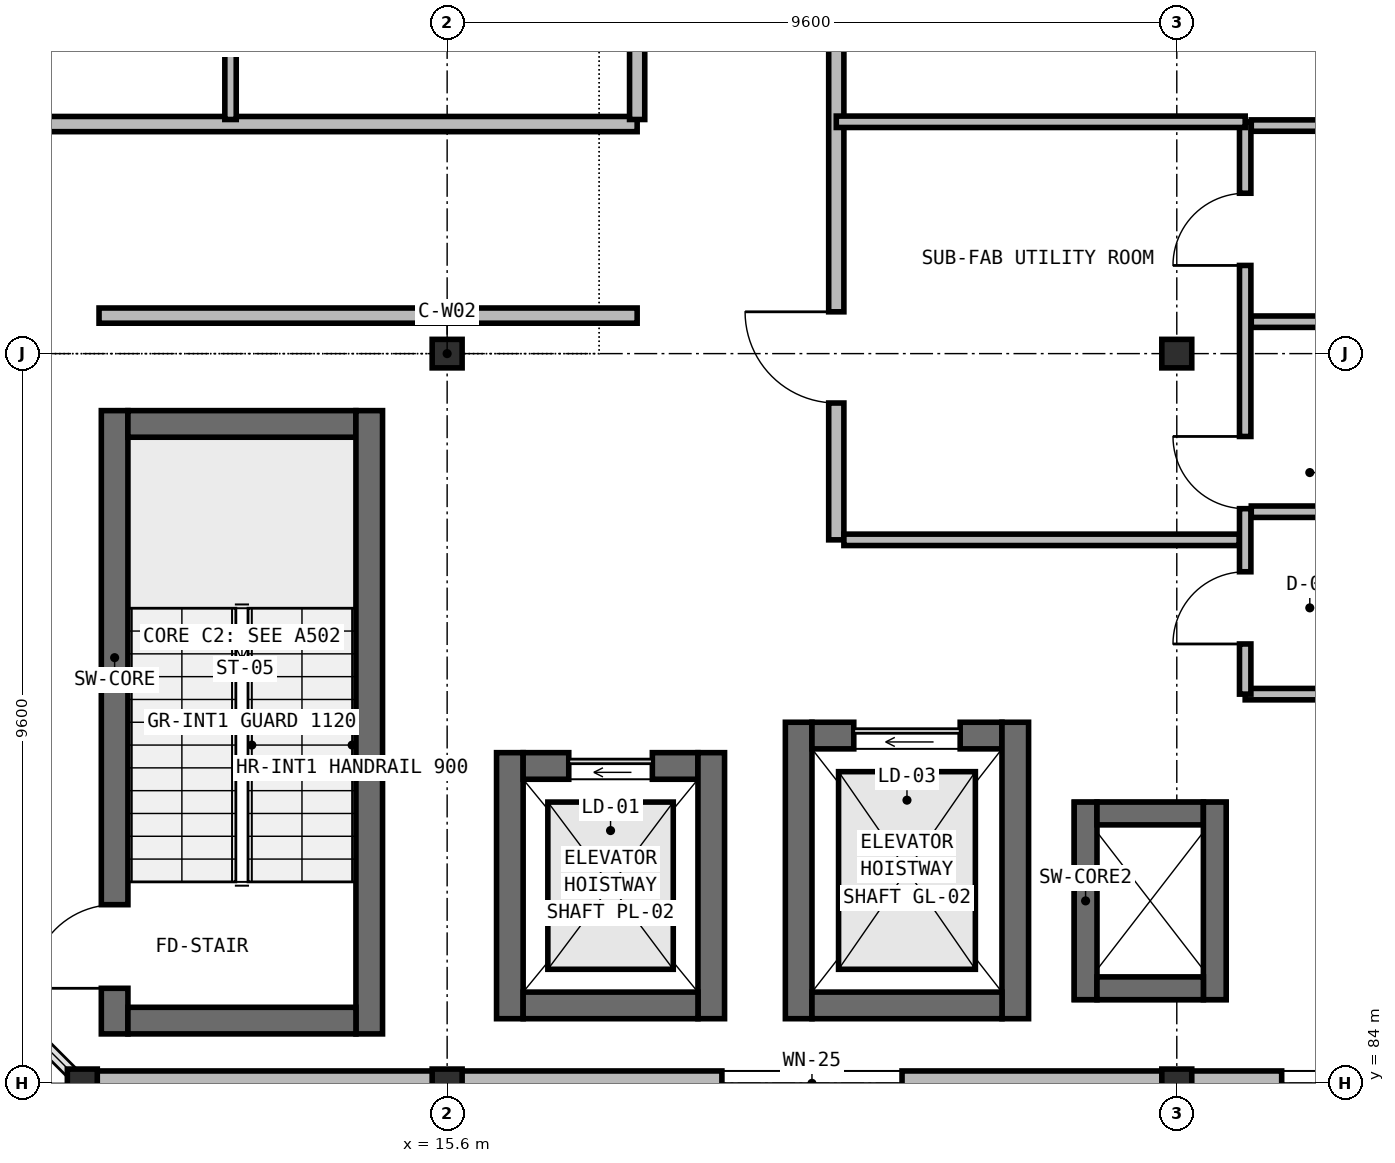
"""IFC4 building model, lengths in metres.
Left out: names, types, materials, properties, quantities, classifications, styles, units other than length and angle.
Written with IfcOpenShell. Run it as: python <this file> out.ifc"""

import sys

from ifc_helpers import new_model, si_unit, direction, frame, frame_2d, origin, origin_2d, place, context, subcontext, project, spatial, rectangle, i_section, extrude, element, fill, save


model = new_model("IFC4")
c1 = context("Model", 3, precision=1e-05, world=origin(), true_north=direction((0.0, 1.0)))
c2 = subcontext(c1, "Body", "Model", "MODEL_VIEW")
j1 = project(units=[si_unit("LENGTHUNIT", "METRE"), si_unit("PLANEANGLEUNIT", "RADIAN")], contexts=[c1])
p1 = place(None, origin())
s1 = spatial("IfcSite", under=j1, at=p1, CompositionType="ELEMENT")
p2 = place(p1, origin())
s2 = spatial("IfcBuilding", under=s1, at=p2, CompositionType="ELEMENT")
p3 = place(p2, frame((0.0, 0.0, 5.25)))
s3 = spatial("IfcBuildingStorey", under=s2, at=p3, CompositionType="ELEMENT", Elevation=5.25)
p4 = place(p3, frame((11.225, 84.65, 0.0), z_axis=(0.0, 0.0, 1.0), x_axis=(0.0, 1.0, 0.0)))
e1 = element("IfcWall", 1, at=p4, inside=s3, PredefinedType="SHEAR", context=c2, shape_type="SweptSolid", body=[
    extrude(rectangle(XDim=8.2, YDim=0.35, at=frame_2d((4.1, 0.0))), origin(), (0.0, 0.0, 1.0), 4.55),
])
p5 = place(p4, frame((0.6, 0.0, 0.0)))
e2 = element("IfcOpeningElement", 2, at=p5, cuts=e1, PredefinedType="OPENING", context=c2, shape_type="SweptSolid", body=[
    extrude(rectangle(XDim=1.1, YDim=2.15, at=frame_2d((0.55, 1.075))), frame((0.0, 0.185, 0.0), z_axis=(0.0, -1.0, 0.0), x_axis=(1.0, 0.0, 0.0)), (0.0, 0.0, 1.0), 0.37),
])
p6 = place(p3, frame((11.4, 92.675, 0.0), z_axis=(0.0, 0.0, 1.0), x_axis=(1.0, 0.0, 0.0)))
e3 = element("IfcWall", 3, at=p6, inside=s3, PredefinedType="SHEAR", context=c2, shape_type="SweptSolid", body=[
    extrude(rectangle(XDim=3.0, YDim=0.35, at=frame_2d((1.5, 0.0))), origin(), (0.0, 0.0, 1.0), 4.55),
])
p7 = place(p3, frame((14.575, 92.85, 0.0), z_axis=(0.0, 0.0, 1.0), x_axis=(0.0, -1.0, 0.0)))
e4 = element("IfcWall", 4, at=p7, inside=s3, PredefinedType="SHEAR", context=c2, shape_type="SweptSolid", body=[
    extrude(rectangle(XDim=8.2, YDim=0.35, at=frame_2d((4.1, 0.0))), origin(), (0.0, 0.0, 1.0), 4.55),
])
p8 = place(p3, frame((14.4, 84.825, 0.0), z_axis=(0.0, 0.0, 1.0), x_axis=(-1.0, 0.0, 0.0)))
e5 = element("IfcWall", 5, at=p8, inside=s3, PredefinedType="SHEAR", context=c2, shape_type="SweptSolid", body=[
    extrude(rectangle(XDim=3.0, YDim=0.35, at=frame_2d((1.5, 0.0))), origin(), (0.0, 0.0, 1.0), 4.55),
])
p9 = place(p3, frame((16.425, 84.85, 0.0), z_axis=(0.0, 0.0, 1.0), x_axis=(0.0, 1.0, 0.0)))
e6 = element("IfcWall", 6, at=p9, inside=s3, PredefinedType="SHEAR", context=c2, shape_type="SweptSolid", body=[
    extrude(rectangle(XDim=3.5, YDim=0.35, at=frame_2d((1.75, 0.0))), origin(), (0.0, 0.0, 1.0), 4.55),
])
p10 = place(p3, frame((16.6, 88.175, 0.0), z_axis=(0.0, 0.0, 1.0), x_axis=(1.0, 0.0, 0.0)))
e7 = element("IfcWall", 7, at=p10, inside=s3, PredefinedType="SHEAR", context=c2, shape_type="SweptSolid", body=[
    extrude(rectangle(XDim=2.3, YDim=0.35, at=frame_2d((1.15, 0.0))), origin(), (0.0, 0.0, 1.0), 4.55),
])
p11 = place(p10, frame((0.6, 0.0, 0.0)))
e8 = element("IfcOpeningElement", 8, at=p11, cuts=e7, PredefinedType="OPENING", context=c2, shape_type="SweptSolid", body=[
    extrude(rectangle(XDim=1.1, YDim=2.15, at=frame_2d((0.55, 1.075))), frame((0.0, 0.185, 0.0), z_axis=(0.0, -1.0, 0.0), x_axis=(1.0, 0.0, 0.0)), (0.0, 0.0, 1.0), 0.37),
])
p12 = place(p3, frame((19.075, 88.35, 0.0), z_axis=(0.0, 0.0, 1.0), x_axis=(0.0, -1.0, 0.0)))
e9 = element("IfcWall", 9, at=p12, inside=s3, PredefinedType="SHEAR", context=c2, shape_type="SweptSolid", body=[
    extrude(rectangle(XDim=3.5, YDim=0.35, at=frame_2d((1.75, 0.0))), origin(), (0.0, 0.0, 1.0), 4.55),
])
p13 = place(p3, frame((18.9, 85.025, 0.0), z_axis=(0.0, 0.0, 1.0), x_axis=(-1.0, 0.0, 0.0)))
e10 = element("IfcWall", 10, at=p13, inside=s3, PredefinedType="SHEAR", context=c2, shape_type="SweptSolid", body=[
    extrude(rectangle(XDim=2.3, YDim=0.35, at=frame_2d((1.15, 0.0))), origin(), (0.0, 0.0, 1.0), 4.55),
])
p14 = place(p3, frame((20.225, 84.85, 0.0), z_axis=(0.0, 0.0, 1.0), x_axis=(0.0, 1.0, 0.0)))
e11 = element("IfcWall", 11, at=p14, inside=s3, PredefinedType="SHEAR", context=c2, shape_type="SweptSolid", body=[
    extrude(rectangle(XDim=3.9, YDim=0.35, at=frame_2d((1.95, 0.0))), origin(), (0.0, 0.0, 1.0), 4.55),
])
p15 = place(p3, frame((20.4, 88.575, 0.0), z_axis=(0.0, 0.0, 1.0), x_axis=(1.0, 0.0, 0.0)))
e12 = element("IfcWall", 12, at=p15, inside=s3, PredefinedType="SHEAR", context=c2, shape_type="SweptSolid", body=[
    extrude(rectangle(XDim=2.5, YDim=0.35, at=frame_2d((1.25, 0.0))), origin(), (0.0, 0.0, 1.0), 4.55),
])
p16 = place(p15, frame((0.55, 0.0, 0.0)))
e13 = element("IfcOpeningElement", 13, at=p16, cuts=e12, PredefinedType="OPENING", context=c2, shape_type="SweptSolid", body=[
    extrude(rectangle(XDim=1.4, YDim=2.3, at=frame_2d((0.7, 1.15))), frame((0.0, 0.185, 0.0), z_axis=(0.0, -1.0, 0.0), x_axis=(1.0, 0.0, 0.0)), (0.0, 0.0, 1.0), 0.37),
])
p17 = place(p3, frame((23.075, 88.75, 0.0), z_axis=(0.0, 0.0, 1.0), x_axis=(0.0, -1.0, 0.0)))
e14 = element("IfcWall", 14, at=p17, inside=s3, PredefinedType="SHEAR", context=c2, shape_type="SweptSolid", body=[
    extrude(rectangle(XDim=3.9, YDim=0.35, at=frame_2d((1.95, 0.0))), origin(), (0.0, 0.0, 1.0), 4.55),
])
p18 = place(p3, frame((22.9, 85.025, 0.0), z_axis=(0.0, 0.0, 1.0), x_axis=(-1.0, 0.0, 0.0)))
e15 = element("IfcWall", 15, at=p18, inside=s3, PredefinedType="SHEAR", context=c2, shape_type="SweptSolid", body=[
    extrude(rectangle(XDim=2.5, YDim=0.35, at=frame_2d((1.25, 0.0))), origin(), (0.0, 0.0, 1.0), 4.55),
])
for number, where, z_axis, x_axis in (
    (16, (15.6, 84.0, 0.0), (0.0, 0.0, 1.0), (1.0, 0.0, 0.0)),
    (17, (15.6, 93.6, 0.0), (0.0, 0.0, 1.0), (1.0, 0.0, 0.0)),
    (18, (25.2, 84.0, 0.0), (0.0, 0.0, 1.0), (1.0, 0.0, 0.0)),
    (19, (25.2, 93.6, 0.0), (0.0, 0.0, 1.0), (1.0, 0.0, 0.0)),
    (20, (10.8, 84.0, 0.0), (0.0, 0.0, 1.0), (1.0, 0.0, 0.0)),
):
    element("IfcColumn", number, at=place(p3, frame(where, z_axis=z_axis, x_axis=x_axis)), inside=s3, PredefinedType="COLUMN", context=c2, shape_type="SweptSolid", body=[
        extrude(i_section(OverallWidth=0.394, OverallDepth=0.375, WebThickness=0.02, FlangeThickness=0.032, at=origin_2d()), origin(), (0.0, 0.0, 1.0), 4.55),
    ])
p19 = place(p3, frame((24.0, 85.1, 0.0), z_axis=(0.0, 0.0, 1.0), x_axis=(0.0, 1.0, 0.0)))
e21 = element("IfcWall", 21, at=p19, inside=s3, PredefinedType="SHEAR", context=c2, shape_type="SweptSolid", body=[
    extrude(rectangle(XDim=2.6, YDim=0.3, at=frame_2d((1.3, 0.0))), origin(), (0.0, 0.0, 1.0), 4.37),
])
p20 = place(p3, frame((24.15, 87.55, 0.0), z_axis=(0.0, 0.0, 1.0), x_axis=(1.0, 0.0, 0.0)))
e22 = element("IfcWall", 22, at=p20, inside=s3, PredefinedType="SHEAR", context=c2, shape_type="SweptSolid", body=[
    extrude(rectangle(XDim=1.4, YDim=0.3, at=frame_2d((0.7, 0.0))), origin(), (0.0, 0.0, 1.0), 4.37),
])
p21 = place(p3, frame((25.7, 87.7, 0.0), z_axis=(0.0, 0.0, 1.0), x_axis=(0.0, -1.0, 0.0)))
e23 = element("IfcWall", 23, at=p21, inside=s3, PredefinedType="SHEAR", context=c2, shape_type="SweptSolid", body=[
    extrude(rectangle(XDim=2.6, YDim=0.3, at=frame_2d((1.3, 0.0))), origin(), (0.0, 0.0, 1.0), 4.37),
])
p22 = place(p3, frame((25.55, 85.25, 0.0), z_axis=(0.0, 0.0, 1.0), x_axis=(-1.0, 0.0, 0.0)))
e24 = element("IfcWall", 24, at=p22, inside=s3, PredefinedType="SHEAR", context=c2, shape_type="SweptSolid", body=[
    extrude(rectangle(XDim=1.4, YDim=0.3, at=frame_2d((0.7, 0.0))), origin(), (0.0, 0.0, 1.0), 4.37),
])
p23 = place(p3, frame((29.996, 84.0, 0.0), z_axis=(0.0, 0.0, 1.0), x_axis=(-1.0, 0.0, 0.0)))
e25 = element("IfcWall", 25, at=p23, inside=s3, PredefinedType="SOLIDWALL", context=c2, shape_type="SweptSolid", body=[
    extrude(rectangle(XDim=4.792, YDim=0.325, at=frame_2d((2.396, 0.0))), origin(), (0.0, 0.0, 1.0), 4.37),
])
p24 = place(p23, frame((1.376, 0.0, 0.95)))
e26 = element("IfcOpeningElement", 26, at=p24, cuts=e25, PredefinedType="OPENING", context=c2, shape_type="SweptSolid", body=[
    extrude(rectangle(XDim=2.04, YDim=1.51, at=frame_2d((1.02, 0.755))), frame((0.0, 0.172, 0.0), z_axis=(0.0, -1.0, 0.0), x_axis=(1.0, 0.0, 0.0)), (0.0, 0.0, 1.0), 0.345),
])
p25 = place(p3, frame((25.196, 84.0, 0.0), z_axis=(0.0, 0.0, 1.0), x_axis=(-1.0, 0.0, 0.0)))
e27 = element("IfcWall", 27, at=p25, inside=s3, PredefinedType="SOLIDWALL", context=c2, shape_type="SweptSolid", body=[
    extrude(rectangle(XDim=9.592, YDim=0.325, at=frame_2d((4.796, 0.0))), origin(), (0.0, 0.0, 1.0), 3.884),
])
p26 = place(p25, frame((3.611, 0.0, 0.95)))
e28 = element("IfcOpeningElement", 28, at=p26, cuts=e27, PredefinedType="OPENING", context=c2, shape_type="SweptSolid", body=[
    extrude(rectangle(XDim=2.37, YDim=1.43, at=frame_2d((1.185, 0.715))), frame((0.0, 0.172, 0.0), z_axis=(0.0, -1.0, 0.0), x_axis=(1.0, 0.0, 0.0)), (0.0, 0.0, 1.0), 0.345),
])
p27 = place(p3, frame((15.596, 84.0, 0.0), z_axis=(0.0, 0.0, 1.0), x_axis=(-1.0, 0.0, 0.0)))
e29 = element("IfcWall", 29, at=p27, inside=s3, PredefinedType="SOLIDWALL", context=c2, shape_type="SweptSolid", body=[
    extrude(rectangle(XDim=4.792, YDim=0.325, at=frame_2d((2.396, 0.0))), origin(), (0.0, 0.0, 1.0), 4.37),
])
for number, where, z_axis, x_axis in (
    (30, (26.18, 91.52, 0.0), (0.0, 0.0, 1.0), (1.0, 0.0, 0.0)),
    (31, (26.18, 94.02, 0.0), (0.0, 0.0, 1.0), (1.0, 0.0, 0.0)),
    (32, (26.18, 96.6, 0.0), (0.0, 0.0, 1.0), (1.0, 0.0, 0.0)),
):
    element("IfcWall", number, at=place(p3, frame(where, z_axis=z_axis, x_axis=x_axis)), inside=s3, PredefinedType="PARTITIONING", context=c2, shape_type="SweptSolid", body=[
        extrude(rectangle(XDim=8.46, YDim=0.15, at=frame_2d((4.23, 0.0))), origin(), (0.0, 0.0, 1.0), 4.23),
    ])
p28 = place(p3, frame((26.1, 89.12, 0.0), z_axis=(0.0, 0.0, 1.0), x_axis=(1.0, 0.0, 0.0)))
e33 = element("IfcWall", 33, at=p28, inside=s3, PredefinedType="PARTITIONING", context=c2, shape_type="SweptSolid", body=[
    extrude(rectangle(XDim=8.54, YDim=0.15, at=frame_2d((4.27, 0.0))), origin(), (0.0, 0.0, 1.0), 4.23),
])
p29 = place(p3, frame((26.1, 89.12, 0.0), z_axis=(0.0, 0.0, 1.0), x_axis=(0.0, 1.0, 0.0)))
e34 = element("IfcWall", 34, at=p29, inside=s3, PredefinedType="PARTITIONING", context=c2, shape_type="SweptSolid", body=[
    extrude(rectangle(XDim=7.53, YDim=0.15, at=frame_2d((3.765, 0.0))), origin(), (0.0, 0.0, 1.0), 4.23),
])
p30 = place(p29, frame((0.66, 0.0, 0.0)))
e35 = element("IfcOpeningElement", 35, at=p30, cuts=e34, PredefinedType="OPENING", context=c2, shape_type="SweptSolid", body=[
    extrude(rectangle(XDim=0.95, YDim=2.1, at=frame_2d((0.475, 1.05))), frame((0.0, 0.085, 0.0), z_axis=(0.0, -1.0, 0.0), x_axis=(1.0, 0.0, 0.0)), (0.0, 0.0, 1.0), 0.17),
])
p31 = place(p29, frame((2.44, 0.0, 0.0)))
e36 = element("IfcOpeningElement", 36, at=p31, cuts=e34, PredefinedType="OPENING", context=c2, shape_type="SweptSolid", body=[
    extrude(rectangle(XDim=0.95, YDim=2.1, at=frame_2d((0.475, 1.05))), frame((0.0, 0.085, 0.0), z_axis=(0.0, -1.0, 0.0), x_axis=(1.0, 0.0, 0.0)), (0.0, 0.0, 1.0), 0.17),
])
p32 = place(p29, frame((5.64, 0.0, 0.0)))
e37 = element("IfcOpeningElement", 37, at=p32, cuts=e34, PredefinedType="OPENING", context=c2, shape_type="SweptSolid", body=[
    extrude(rectangle(XDim=0.95, YDim=2.1, at=frame_2d((0.475, 1.05))), frame((0.0, 0.085, 0.0), z_axis=(0.0, -1.0, 0.0), x_axis=(1.0, 0.0, 0.0)), (0.0, 0.0, 1.0), 0.17),
])
p33 = place(p3, frame((6.16, 96.62, 0.0), z_axis=(0.0, 0.0, 1.0), x_axis=(1.0, 0.0, 0.0)))
e38 = element("IfcWall", 38, at=p33, inside=s3, PredefinedType="SOLIDWALL", context=c2, shape_type="SweptSolid", body=[
    extrude(rectangle(XDim=11.94, YDim=0.2, at=frame_2d((5.97, 0.0))), origin(), (0.0, 0.0, 1.0), 4.23),
])
p34 = place(p3, frame((11.02, 94.1, 0.0), z_axis=(0.0, 0.0, 1.0), x_axis=(1.0, 0.0, 0.0)))
e39 = element("IfcWall", 39, at=p34, inside=s3, PredefinedType="SOLIDWALL", context=c2, shape_type="SweptSolid", body=[
    extrude(rectangle(XDim=7.08, YDim=0.2, at=frame_2d((3.54, 0.0))), origin(), (0.0, 0.0, 1.0), 4.23),
])
p35 = place(p3, frame((12.75, 96.68, 0.0), z_axis=(0.0, 0.0, 1.0), x_axis=(0.0, 1.0, 0.0)))
e40 = element("IfcWall", 40, at=p35, inside=s3, PredefinedType="PARTITIONING", context=c2, shape_type="SweptSolid", body=[
    extrude(rectangle(XDim=3.25, YDim=0.15, at=frame_2d((1.625, 0.0))), origin(), (0.0, 0.0, 1.0), 4.23),
])
p36 = place(p3, frame((18.1, 96.68, 0.0), z_axis=(0.0, 0.0, 1.0), x_axis=(0.0, 1.0, 0.0)))
e41 = element("IfcWall", 41, at=p36, inside=s3, PredefinedType="SOLIDWALL", context=c2, shape_type="SweptSolid", body=[
    extrude(rectangle(XDim=20.76, YDim=0.2, at=frame_2d((10.38, 0.0))), origin(), (0.0, 0.0, 1.0), 4.23),
])
p37 = place(p36, frame((1.0, 0.0, 0.0)))
e42 = element("IfcOpeningElement", 42, at=p37, cuts=e41, PredefinedType="OPENING", context=c2, shape_type="SweptSolid", body=[
    extrude(rectangle(XDim=1.2, YDim=2.2, at=frame_2d((0.6, 1.1))), frame((0.0, 0.11, 0.0), z_axis=(0.0, -1.0, 0.0), x_axis=(1.0, 0.0, 0.0)), (0.0, 0.0, 1.0), 0.22),
])
p38 = place(p36, frame((4.5, 0.0, 0.0)))
e43 = element("IfcOpeningElement", 43, at=p38, cuts=e41, PredefinedType="OPENING", context=c2, shape_type="SweptSolid", body=[
    extrude(rectangle(XDim=1.2, YDim=2.2, at=frame_2d((0.6, 1.1))), frame((0.0, 0.11, 0.0), z_axis=(0.0, -1.0, 0.0), x_axis=(1.0, 0.0, 0.0)), (0.0, 0.0, 1.0), 0.22),
])
p39 = place(p36, frame((11.2, 0.0, 0.0)))
e44 = element("IfcOpeningElement", 44, at=p39, cuts=e41, PredefinedType="OPENING", context=c2, shape_type="SweptSolid", body=[
    extrude(rectangle(XDim=1.35, YDim=2.2, at=frame_2d((0.675, 1.1))), frame((0.0, 0.11, 0.0), z_axis=(0.0, -1.0, 0.0), x_axis=(1.0, 0.0, 0.0)), (0.0, 0.0, 1.0), 0.22),
])
p40 = place(p3, frame((20.72, 91.15, 0.0), z_axis=(0.0, 0.0, 1.0), x_axis=(0.0, 1.0, 0.0)))
e45 = element("IfcWall", 45, at=p40, inside=s3, PredefinedType="SOLIDWALL", context=c2, shape_type="SweptSolid", body=[
    extrude(rectangle(XDim=12.8, YDim=0.2, at=frame_2d((6.4, 0.0))), origin(), (0.0, 0.0, 1.0), 4.23),
])
p41 = place(p40, frame((1.8, 0.0, 0.0)))
e46 = element("IfcOpeningElement", 46, at=p41, cuts=e45, PredefinedType="OPENING", context=c2, shape_type="SweptSolid", body=[
    extrude(rectangle(XDim=1.2, YDim=2.2, at=frame_2d((0.6, 1.1))), frame((0.0, 0.11, 0.0), z_axis=(0.0, -1.0, 0.0), x_axis=(1.0, 0.0, 0.0)), (0.0, 0.0, 1.0), 0.22),
])
p42 = place(p40, frame((6.8, 0.0, 0.0)))
e47 = element("IfcOpeningElement", 47, at=p42, cuts=e45, PredefinedType="OPENING", context=c2, shape_type="SweptSolid", body=[
    extrude(rectangle(XDim=1.35, YDim=2.2, at=frame_2d((0.675, 1.1))), frame((0.0, 0.11, 0.0), z_axis=(0.0, -1.0, 0.0), x_axis=(1.0, 0.0, 0.0)), (0.0, 0.0, 1.0), 0.22),
])
p43 = place(p3, frame((20.82, 91.15, 0.0), z_axis=(0.0, 0.0, 1.0), x_axis=(1.0, 0.0, 0.0)))
e48 = element("IfcWall", 48, at=p43, inside=s3, PredefinedType="PARTITIONING", context=c2, shape_type="SweptSolid", body=[
    extrude(rectangle(XDim=5.2, YDim=0.15, at=frame_2d((2.6, 0.0))), origin(), (0.0, 0.0, 1.0), 4.23),
])
p44 = place(p3, frame((20.72, 96.65, 0.0), z_axis=(0.0, 0.0, 1.0), x_axis=(1.0, 0.0, 0.0)))
e49 = element("IfcWall", 49, at=p44, inside=s3, PredefinedType="PARTITIONING", context=c2, shape_type="SweptSolid", body=[
    extrude(rectangle(XDim=5.38, YDim=0.15, at=frame_2d((2.69, 0.0))), origin(), (0.0, 0.0, 1.0), 4.23),
])
p45 = place(p24, origin())
e50 = element("IfcWindow", 50, at=p45, inside=s3, PartitioningType="SINGLE_PANEL", PredefinedType="WINDOW", context=c2, shape_type="SweptSolid", body=[
    extrude(rectangle(XDim=2.04, YDim=1.51, at=frame_2d((1.02, 0.755))), frame((0.0, 0.03, 0.0), z_axis=(0.0, -1.0, 0.0), x_axis=(1.0, 0.0, 0.0)), (0.0, 0.0, 1.0), 0.06),
])
fill(e26, e50)
p46 = place(p26, origin())
e51 = element("IfcWindow", 51, at=p46, inside=s3, PartitioningType="SINGLE_PANEL", PredefinedType="WINDOW", context=c2, shape_type="SweptSolid", body=[
    extrude(rectangle(XDim=2.37, YDim=1.43, at=frame_2d((1.185, 0.715))), frame((0.0, 0.03, 0.0), z_axis=(0.0, -1.0, 0.0), x_axis=(1.0, 0.0, 0.0)), (0.0, 0.0, 1.0), 0.06),
])
fill(e28, e51)
p47 = place(p5, origin())
e52 = element("IfcDoor", 52, at=p47, inside=s3, OperationType="SINGLE_SWING_LEFT", PredefinedType="DOOR", context=c2, shape_type="SweptSolid", body=[
    extrude(rectangle(XDim=1.1, YDim=2.15, at=frame_2d((0.55, 1.075))), frame((0.0, 0.025, 0.0), z_axis=(0.0, -1.0, 0.0), x_axis=(1.0, 0.0, 0.0)), (0.0, 0.0, 1.0), 0.05),
])
fill(e2, e52)
p48 = place(p11, origin())
e53 = element("IfcDoor", 53, at=p48, inside=s3, OperationType="SLIDING_TO_LEFT", PredefinedType="USERDEFINED", context=c2, shape_type="SweptSolid", body=[
    extrude(rectangle(XDim=1.1, YDim=2.15, at=frame_2d((0.55, 1.075))), frame((0.0, 0.025, 0.0), z_axis=(0.0, -1.0, 0.0), x_axis=(1.0, 0.0, 0.0)), (0.0, 0.0, 1.0), 0.05),
])
fill(e8, e53)
p49 = place(p16, origin())
e54 = element("IfcDoor", 54, at=p49, inside=s3, OperationType="SLIDING_TO_LEFT", PredefinedType="USERDEFINED", context=c2, shape_type="SweptSolid", body=[
    extrude(rectangle(XDim=1.4, YDim=2.3, at=frame_2d((0.7, 1.15))), frame((0.0, 0.025, 0.0), z_axis=(0.0, -1.0, 0.0), x_axis=(1.0, 0.0, 0.0)), (0.0, 0.0, 1.0), 0.05),
])
fill(e13, e54)
p50 = place(p30, origin())
e55 = element("IfcDoor", 55, at=p50, inside=s3, OperationType="SINGLE_SWING_LEFT", PredefinedType="DOOR", context=c2, shape_type="SweptSolid", body=[
    extrude(rectangle(XDim=0.95, YDim=2.1, at=frame_2d((0.475, 1.05))), frame((0.0, 0.025, 0.0), z_axis=(0.0, -1.0, 0.0), x_axis=(1.0, 0.0, 0.0)), (0.0, 0.0, 1.0), 0.05),
])
fill(e35, e55)
p51 = place(p31, origin())
e56 = element("IfcDoor", 56, at=p51, inside=s3, OperationType="SINGLE_SWING_RIGHT", PredefinedType="DOOR", context=c2, shape_type="SweptSolid", body=[
    extrude(rectangle(XDim=0.95, YDim=2.1, at=frame_2d((0.475, 1.05))), frame((0.0, 0.025, 0.0), z_axis=(0.0, -1.0, 0.0), x_axis=(1.0, 0.0, 0.0)), (0.0, 0.0, 1.0), 0.05),
])
fill(e36, e56)
p52 = place(p32, origin())
e57 = element("IfcDoor", 57, at=p52, inside=s3, OperationType="SINGLE_SWING_LEFT", PredefinedType="DOOR", context=c2, shape_type="SweptSolid", body=[
    extrude(rectangle(XDim=0.95, YDim=2.1, at=frame_2d((0.475, 1.05))), frame((0.0, 0.025, 0.0), z_axis=(0.0, -1.0, 0.0), x_axis=(1.0, 0.0, 0.0)), (0.0, 0.0, 1.0), 0.05),
])
fill(e37, e57)
p53 = place(p41, origin())
e58 = element("IfcDoor", 58, at=p53, inside=s3, OperationType="SINGLE_SWING_RIGHT", PredefinedType="DOOR", context=c2, shape_type="SweptSolid", body=[
    extrude(rectangle(XDim=1.2, YDim=2.2, at=frame_2d((0.6, 1.1))), frame((0.0, 0.025, 0.0), z_axis=(0.0, -1.0, 0.0), x_axis=(1.0, 0.0, 0.0)), (0.0, 0.0, 1.0), 0.05),
])
fill(e46, e58)
save(model, sys.argv[1])
